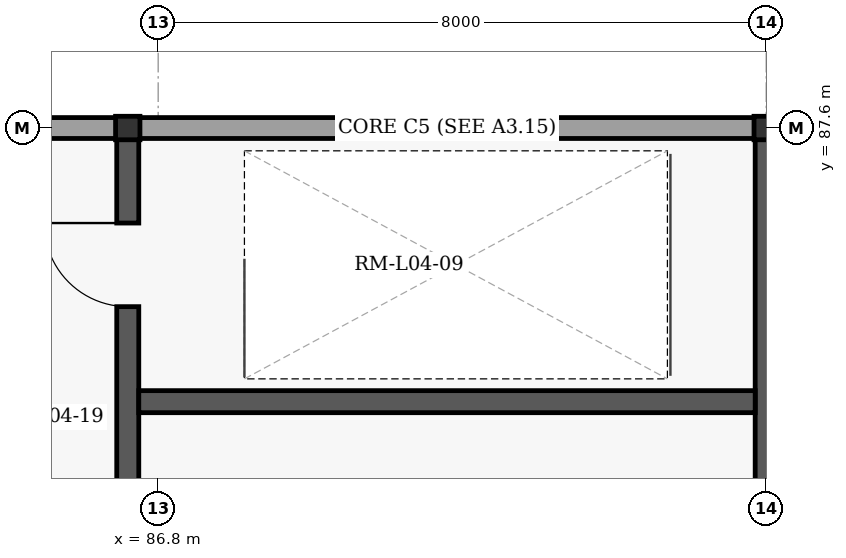
"""IFC4 building model, lengths in metres.
Left out: names, types, materials, properties, quantities, classifications, styles, units other than length and angle.
Written with IfcOpenShell. Run it as: python <this file> out.ifc"""

import sys

from ifc_helpers import new_model, si_unit, direction, frame, frame_2d, origin, origin_2d, place, context, subcontext, project, spatial, rectangle, i_section, extrude, element, fill, save


model = new_model("IFC4")
c1 = context("Model", 3, precision=1e-05, world=origin(), true_north=direction((0.0, 1.0)))
c2 = subcontext(c1, "Body", "Model", "MODEL_VIEW")
j1 = project(units=[si_unit("LENGTHUNIT", "METRE"), si_unit("PLANEANGLEUNIT", "RADIAN")], contexts=[c1])
p1 = place(None, origin())
s1 = spatial("IfcSite", under=j1, at=p1, CompositionType="ELEMENT")
p2 = place(p1, origin())
s2 = spatial("IfcBuilding", under=s1, at=p2, CompositionType="ELEMENT")
p3 = place(p2, frame((0.0, 0.0, 20.4)))
s3 = spatial("IfcBuildingStorey", under=s2, at=p3, CompositionType="ELEMENT", Elevation=20.4)
for number, where, z_axis, x_axis in (
    (1, (86.4, 87.6, 0.0), (0.0, 0.0, 1.0), (1.0, 0.0, 0.0)),
    (2, (94.8, 87.6, 0.0), (0.0, 0.0, 1.0), (1.0, 0.0, 0.0)),
):
    element("IfcColumn", number, at=place(p3, frame(where, z_axis=z_axis, x_axis=x_axis)), inside=s3, PredefinedType="COLUMN", context=c2, shape_type="SweptSolid", body=[
        extrude(i_section(OverallWidth=0.309, OverallDepth=0.321, WebThickness=0.014, FlangeThickness=0.022, at=origin_2d()), origin(), (0.0, 0.0, 1.0), 4.5),
    ])
p4 = place(p3, frame((78.8, 87.6, 0.0), z_axis=(0.0, 0.0, 1.0), x_axis=(1.0, 0.0, 0.0)))
e3 = element("IfcWall", 3, at=p4, inside=s3, PredefinedType="SOLIDWALL", context=c2, shape_type="SweptSolid", body=[
    extrude(rectangle(XDim=32.0, YDim=0.275, at=frame_2d((16.0, 0.0))), origin(), (0.0, 0.0, 1.0), 3.62),
])
p5 = place(p4, frame((2.2, 0.0, 0.9)))
e4 = element("IfcOpeningElement", 4, at=p5, cuts=e3, PredefinedType="OPENING", context=c2, shape_type="SweptSolid", body=[
    extrude(rectangle(XDim=1.6, YDim=1.65, at=frame_2d((0.8, 0.825))), frame((0.0, 0.147, 0.0), z_axis=(0.0, -1.0, 0.0), x_axis=(1.0, 0.0, 0.0)), (0.0, 0.0, 1.0), 0.295),
])
p6 = place(p4, frame((19.24, 0.0, 0.9)))
e5 = element("IfcOpeningElement", 5, at=p6, cuts=e3, PredefinedType="OPENING", context=c2, shape_type="SweptSolid", body=[
    extrude(rectangle(XDim=1.6, YDim=1.65, at=frame_2d((0.8, 0.825))), frame((0.0, 0.147, 0.0), z_axis=(0.0, -1.0, 0.0), x_axis=(1.0, 0.0, 0.0)), (0.0, 0.0, 1.0), 0.295),
])
p7 = place(p4, frame((24.92, 0.0, 0.9)))
e6 = element("IfcOpeningElement", 6, at=p7, cuts=e3, PredefinedType="OPENING", context=c2, shape_type="SweptSolid", body=[
    extrude(rectangle(XDim=1.6, YDim=1.65, at=frame_2d((0.8, 0.825))), frame((0.0, 0.147, 0.0), z_axis=(0.0, -1.0, 0.0), x_axis=(1.0, 0.0, 0.0)), (0.0, 0.0, 1.0), 0.295),
])
p8 = place(p3, frame((86.4, 79.745, 0.0), z_axis=(0.0, 0.0, 1.0), x_axis=(0.0, 1.0, 0.0)))
e7 = element("IfcWall", 7, at=p8, inside=s3, PredefinedType="SHEAR", context=c2, shape_type="SweptSolid", body=[
    extrude(rectangle(XDim=7.71, YDim=0.29, at=frame_2d((3.855, 0.0))), origin(), (0.0, 0.0, 1.0), 4.255),
])
p9 = place(p8, frame((5.505, 0.0, 0.0)))
e8 = element("IfcOpeningElement", 8, at=p9, cuts=e7, PredefinedType="OPENING", context=c2, shape_type="SweptSolid", body=[
    extrude(rectangle(XDim=1.1, YDim=2.15, at=frame_2d((0.55, 1.075))), frame((0.0, 0.155, 0.0), z_axis=(0.0, -1.0, 0.0), x_axis=(1.0, 0.0, 0.0)), (0.0, 0.0, 1.0), 0.31),
])
p10 = place(p8, frame((1.48, 0.0, 0.0)))
e9 = element("IfcOpeningElement", 9, at=p10, cuts=e7, PredefinedType="OPENING", context=c2, shape_type="SweptSolid", body=[
    extrude(rectangle(XDim=1.15, YDim=2.2, at=frame_2d((0.575, 1.1))), frame((0.0, 0.155, 0.0), z_axis=(0.0, -1.0, 0.0), x_axis=(1.0, 0.0, 0.0)), (0.0, 0.0, 1.0), 0.31),
])
p11 = place(p3, frame((94.8, 79.745, 0.0), z_axis=(0.0, 0.0, 1.0), x_axis=(0.0, 1.0, 0.0)))
e10 = element("IfcWall", 10, at=p11, inside=s3, PredefinedType="SHEAR", context=c2, shape_type="SweptSolid", body=[
    extrude(rectangle(XDim=7.71, YDim=0.29, at=frame_2d((3.855, 0.0))), origin(), (0.0, 0.0, 1.0), 4.255),
])
p12 = place(p3, frame((86.545, 84.0, 0.0), z_axis=(0.0, 0.0, 1.0), x_axis=(1.0, 0.0, 0.0)))
e11 = element("IfcWall", 11, at=p12, inside=s3, PredefinedType="SHEAR", context=c2, shape_type="SweptSolid", body=[
    extrude(rectangle(XDim=8.11, YDim=0.29, at=frame_2d((4.055, 0.0))), origin(), (0.0, 0.0, 1.0), 4.255),
])
p13 = place(p9, origin())
e12 = element("IfcDoor", 12, at=p13, inside=s3, OperationType="SINGLE_SWING_RIGHT", PredefinedType="DOOR", context=c2, shape_type="SweptSolid", body=[
    extrude(rectangle(XDim=1.1, YDim=2.15, at=frame_2d((0.55, 1.075))), frame((0.0, 0.025, 0.0), z_axis=(0.0, -1.0, 0.0), x_axis=(1.0, 0.0, 0.0)), (0.0, 0.0, 1.0), 0.05),
])
fill(e8, e12)
save(model, sys.argv[1])
